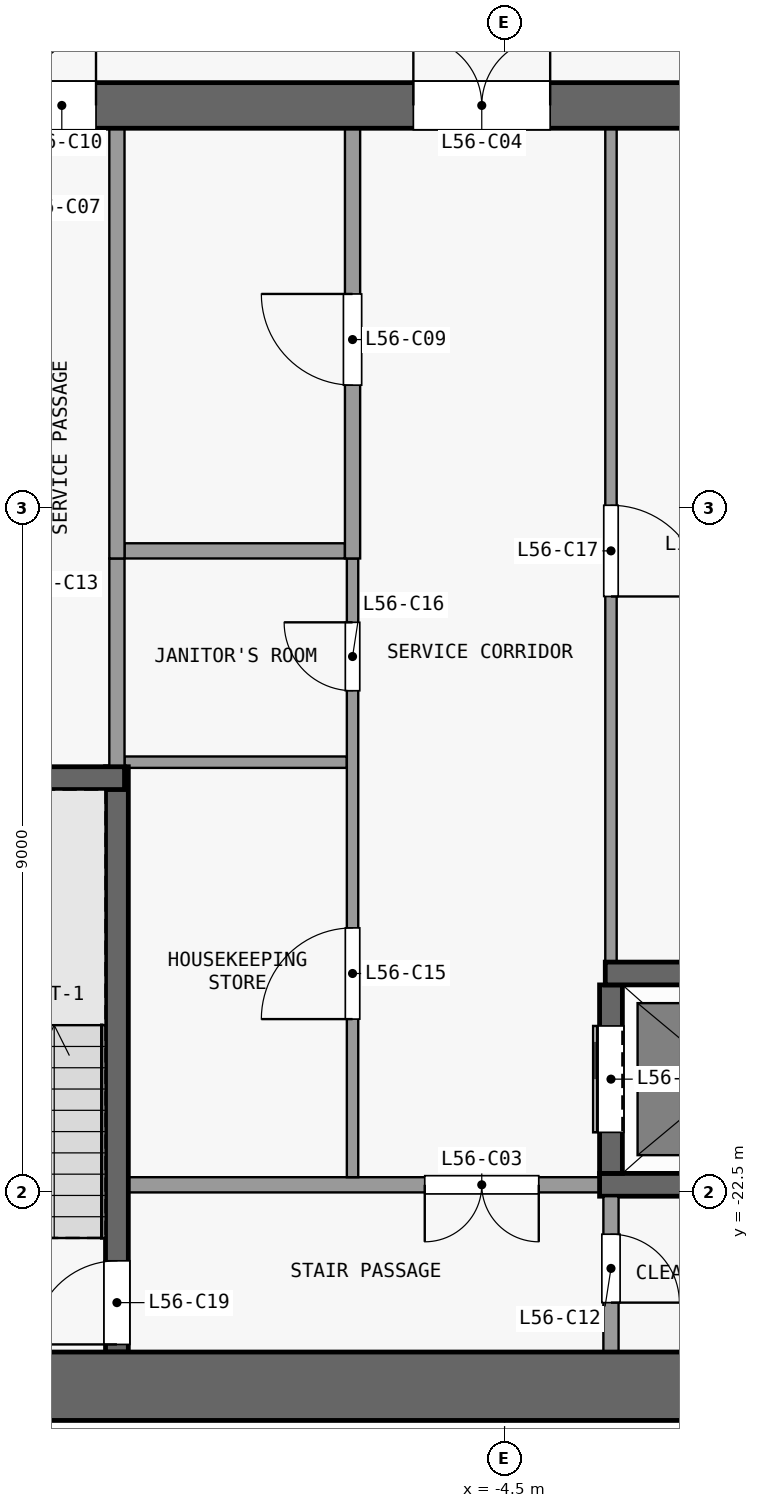
"""IFC4 building model, lengths in metres.
Left out: names, types, materials, properties, quantities, classifications, styles, units other than length and angle.
Written with IfcOpenShell. Run it as: python <this file> out.ifc"""

import sys

from ifc_helpers import new_model, si_unit, direction, frame, frame_2d, origin, place, context, subcontext, project, spatial, rectangle, extrude, element, fill, save


model = new_model("IFC4")
c1 = context("Model", 3, precision=1e-05, world=origin(), true_north=direction((0.0, 1.0)))
c2 = subcontext(c1, "Body", "Model", "MODEL_VIEW")
j1 = project(units=[si_unit("LENGTHUNIT", "METRE"), si_unit("PLANEANGLEUNIT", "RADIAN")], contexts=[c1])
p1 = place(None, origin())
s1 = spatial("IfcSite", under=j1, at=p1, CompositionType="ELEMENT")
p2 = place(p1, origin())
s2 = spatial("IfcBuilding", under=s1, at=p2, CompositionType="ELEMENT")
p3 = place(p2, frame((0.0, 0.0, 223.1)))
s3 = spatial("IfcBuildingStorey", under=s2, at=p3, CompositionType="ELEMENT", Elevation=223.1)
p4 = place(p3, frame((-13.2, -25.05, 0.0), z_axis=(0.0, 0.0, 1.0), x_axis=(1.0, 0.0, 0.0)))
e1 = element("IfcWall", 1, at=p4, inside=s3, PredefinedType="SHEAR", context=c2, shape_type="SweptSolid", body=[
    extrude(rectangle(XDim=26.4, YDim=0.9, at=frame_2d((13.2, 0.0))), origin(), (0.0, 0.0, 1.0), 3.3),
])
p5 = place(p3, frame((-13.2, -8.2, 0.0), z_axis=(0.0, 0.0, 1.0), x_axis=(1.0, 0.0, 0.0)))
e2 = element("IfcWall", 2, at=p5, inside=s3, PredefinedType="SHEAR", context=c2, shape_type="SweptSolid", body=[
    extrude(rectangle(XDim=26.4, YDim=0.6, at=frame_2d((13.2, 0.0))), origin(), (0.0, 0.0, 1.0), 3.3),
])
p6 = place(p5, frame((7.5, 0.0, 0.0)))
e3 = element("IfcOpeningElement", 3, at=p6, cuts=e2, PredefinedType="OPENING", context=c2, shape_type="SweptSolid", body=[
    extrude(rectangle(XDim=1.8, YDim=2.1, at=frame_2d((0.9, 1.05))), frame((0.0, 0.31, 0.0), z_axis=(0.0, -1.0, 0.0), x_axis=(1.0, 0.0, 0.0)), (0.0, 0.0, 1.0), 0.62),
])
p7 = place(p5, frame((17.1, 0.0, 0.0)))
e4 = element("IfcOpeningElement", 4, at=p7, cuts=e2, PredefinedType="OPENING", context=c2, shape_type="SweptSolid", body=[
    extrude(rectangle(XDim=1.8, YDim=2.1, at=frame_2d((0.9, 1.05))), frame((0.0, 0.31, 0.0), z_axis=(0.0, -1.0, 0.0), x_axis=(1.0, 0.0, 0.0)), (0.0, 0.0, 1.0), 0.62),
])
p8 = place(p5, frame((2.425, 0.0, 0.0)))
e5 = element("IfcOpeningElement", 5, at=p8, cuts=e2, PredefinedType="OPENING", context=c2, shape_type="SweptSolid", body=[
    extrude(rectangle(XDim=0.9, YDim=2.1, at=frame_2d((0.45, 1.05))), frame((0.0, 0.31, 0.0), z_axis=(0.0, -1.0, 0.0), x_axis=(1.0, 0.0, 0.0)), (0.0, 0.0, 1.0), 0.62),
])
p9 = place(p5, frame((23.075, 0.0, 0.0)))
e6 = element("IfcOpeningElement", 6, at=p9, cuts=e2, PredefinedType="OPENING", context=c2, shape_type="SweptSolid", body=[
    extrude(rectangle(XDim=0.9, YDim=2.1, at=frame_2d((0.45, 1.05))), frame((0.0, 0.31, 0.0), z_axis=(0.0, -1.0, 0.0), x_axis=(1.0, 0.0, 0.0)), (0.0, 0.0, 1.0), 0.62),
])
p10 = place(p3, frame((-3.25, -22.4, 0.0), z_axis=(0.0, 0.0, 1.0), x_axis=(-1.0, 0.0, 0.0)))
e7 = element("IfcWall", 7, at=p10, inside=s3, PredefinedType="PARTITIONING", context=c2, shape_type="SweptSolid", body=[
    extrude(rectangle(XDim=6.2, YDim=0.2, at=frame_2d((3.1, 0.0))), origin(), (0.0, 0.0, 1.0), 3.3),
])
p11 = place(p10, frame((0.8, 0.0, 0.0)))
e8 = element("IfcOpeningElement", 8, at=p11, cuts=e7, PredefinedType="OPENING", context=c2, shape_type="SweptSolid", body=[
    extrude(rectangle(XDim=1.5, YDim=2.1, at=frame_2d((0.75, 1.05))), frame((0.0, 0.11, 0.0), z_axis=(0.0, -1.0, 0.0), x_axis=(1.0, 0.0, 0.0)), (0.0, 0.0, 1.0), 0.22),
])
p12 = place(p3, frame((-3.25, -22.4, 0.0), z_axis=(0.0, 0.0, 1.0), x_axis=(1.0, 0.0, 0.0)))
e9 = element("IfcWall", 9, at=p12, inside=s3, PredefinedType="SHEAR", context=c2, shape_type="SweptSolid", body=[
    extrude(rectangle(XDim=6.5, YDim=0.3, at=frame_2d((3.25, 0.0))), origin(), (0.0, 0.0, 1.0), 3.3),
])
p13 = place(p3, frame((-3.175, -19.62, 0.0), z_axis=(0.0, 0.0, 1.0), x_axis=(1.0, 0.0, 0.0)))
e10 = element("IfcWall", 10, at=p13, inside=s3, PredefinedType="SHEAR", context=c2, shape_type="SweptSolid", body=[
    extrude(rectangle(XDim=3.025, YDim=0.3, at=frame_2d((1.513, 0.0))), origin(), (0.0, 0.0, 1.0), 3.3),
])
p14 = place(p3, frame((-12.6, -17.05, 0.0), z_axis=(0.0, 0.0, 1.0), x_axis=(1.0, 0.0, 0.0)))
e11 = element("IfcWall", 11, at=p14, inside=s3, PredefinedType="SHEAR", context=c2, shape_type="SweptSolid", body=[
    extrude(rectangle(XDim=3.1, YDim=0.3, at=frame_2d((1.55, 0.0))), origin(), (0.0, 0.0, 1.0), 3.3),
])
p15 = place(p3, frame((-9.5, -16.84, 0.0), z_axis=(0.0, 0.0, 1.0), x_axis=(1.0, 0.0, 0.0)))
e12 = element("IfcWall", 12, at=p15, inside=s3, PredefinedType="PARTITIONING", context=c2, shape_type="SweptSolid", body=[
    extrude(rectangle(XDim=2.925, YDim=0.15, at=frame_2d((1.462, 0.0))), origin(), (0.0, 0.0, 1.0), 3.3),
])
p16 = place(p3, frame((-9.5, -14.06, 0.0), z_axis=(0.0, 0.0, 1.0), x_axis=(1.0, 0.0, 0.0)))
e13 = element("IfcWall", 13, at=p16, inside=s3, PredefinedType="PARTITIONING", context=c2, shape_type="SweptSolid", body=[
    extrude(rectangle(XDim=2.9, YDim=0.2, at=frame_2d((1.45, 0.0))), origin(), (0.0, 0.0, 1.0), 3.3),
])
p17 = place(p3, frame((-9.6, -24.6, 0.0), z_axis=(0.0, 0.0, 1.0), x_axis=(0.0, 1.0, 0.0)))
e14 = element("IfcWall", 14, at=p17, inside=s3, PredefinedType="SHEAR", context=c2, shape_type="SweptSolid", body=[
    extrude(rectangle(XDim=7.7, YDim=0.3, at=frame_2d((3.85, 0.0))), origin(), (0.0, 0.0, 1.0), 3.3),
])
p18 = place(p17, frame((0.1, 0.0, 0.0)))
e15 = element("IfcOpeningElement", 15, at=p18, cuts=e14, PredefinedType="OPENING", context=c2, shape_type="SweptSolid", body=[
    extrude(rectangle(XDim=1.1, YDim=2.1, at=frame_2d((0.55, 1.05))), frame((0.0, 0.16, 0.0), z_axis=(0.0, -1.0, 0.0), x_axis=(1.0, 0.0, 0.0)), (0.0, 0.0, 1.0), 0.32),
])
p19 = place(p3, frame((-9.6, -16.9, 0.0), z_axis=(0.0, 0.0, 1.0), x_axis=(0.0, 1.0, 0.0)))
e16 = element("IfcWall", 16, at=p19, inside=s3, PredefinedType="PARTITIONING", context=c2, shape_type="SweptSolid", body=[
    extrude(rectangle(XDim=2.74, YDim=0.2, at=frame_2d((1.37, 0.0))), origin(), (0.0, 0.0, 1.0), 3.3),
])
p20 = place(p3, frame((-9.6, -14.16, 0.0), z_axis=(0.0, 0.0, 1.0), x_axis=(0.0, 1.0, 0.0)))
e17 = element("IfcWall", 17, at=p20, inside=s3, PredefinedType="PARTITIONING", context=c2, shape_type="SweptSolid", body=[
    extrude(rectangle(XDim=5.66, YDim=0.2, at=frame_2d((2.83, 0.0))), origin(), (0.0, 0.0, 1.0), 3.3),
])
p21 = place(p3, frame((-6.5, -22.3, 0.0), z_axis=(0.0, 0.0, 1.0), x_axis=(0.0, 1.0, 0.0)))
e18 = element("IfcWall", 18, at=p21, inside=s3, PredefinedType="PARTITIONING", context=c2, shape_type="SweptSolid", body=[
    extrude(rectangle(XDim=8.14, YDim=0.15, at=frame_2d((4.07, 0.0))), origin(), (0.0, 0.0, 1.0), 3.3),
])
p22 = place(p21, frame((2.08, 0.0, 0.0)))
e19 = element("IfcOpeningElement", 19, at=p22, cuts=e18, PredefinedType="OPENING", context=c2, shape_type="SweptSolid", body=[
    extrude(rectangle(XDim=1.2, YDim=2.1, at=frame_2d((0.6, 1.05))), frame((0.0, 0.085, 0.0), z_axis=(0.0, -1.0, 0.0), x_axis=(1.0, 0.0, 0.0)), (0.0, 0.0, 1.0), 0.17),
])
p23 = place(p21, frame((6.4, 0.0, 0.0)))
e20 = element("IfcOpeningElement", 20, at=p23, cuts=e18, PredefinedType="OPENING", context=c2, shape_type="SweptSolid", body=[
    extrude(rectangle(XDim=0.9, YDim=2.1, at=frame_2d((0.45, 1.05))), frame((0.0, 0.085, 0.0), z_axis=(0.0, -1.0, 0.0), x_axis=(1.0, 0.0, 0.0)), (0.0, 0.0, 1.0), 0.17),
])
p24 = place(p3, frame((-6.5, -14.16, 0.0), z_axis=(0.0, 0.0, 1.0), x_axis=(0.0, 1.0, 0.0)))
e21 = element("IfcWall", 21, at=p24, inside=s3, PredefinedType="PARTITIONING", context=c2, shape_type="SweptSolid", body=[
    extrude(rectangle(XDim=5.66, YDim=0.2, at=frame_2d((2.83, 0.0))), origin(), (0.0, 0.0, 1.0), 3.3),
])
p25 = place(p24, frame((2.28, 0.0, 0.0)))
e22 = element("IfcOpeningElement", 22, at=p25, cuts=e21, PredefinedType="OPENING", context=c2, shape_type="SweptSolid", body=[
    extrude(rectangle(XDim=1.2, YDim=2.1, at=frame_2d((0.6, 1.05))), frame((0.0, 0.11, 0.0), z_axis=(0.0, -1.0, 0.0), x_axis=(1.0, 0.0, 0.0)), (0.0, 0.0, 1.0), 0.22),
])
p26 = place(p3, frame((-3.1, -22.55, 0.0), z_axis=(0.0, 0.0, 1.0), x_axis=(0.0, -1.0, 0.0)))
e23 = element("IfcWall", 23, at=p26, inside=s3, PredefinedType="PARTITIONING", context=c2, shape_type="SweptSolid", body=[
    extrude(rectangle(XDim=2.05, YDim=0.2, at=frame_2d((1.025, 0.0))), origin(), (0.0, 0.0, 1.0), 3.3),
])
p27 = place(p26, frame((0.5, 0.0, 0.0)))
e24 = element("IfcOpeningElement", 24, at=p27, cuts=e23, PredefinedType="OPENING", context=c2, shape_type="SweptSolid", body=[
    extrude(rectangle(XDim=0.9, YDim=2.1, at=frame_2d((0.45, 1.05))), frame((0.0, 0.11, 0.0), z_axis=(0.0, -1.0, 0.0), x_axis=(1.0, 0.0, 0.0)), (0.0, 0.0, 1.0), 0.22),
])
p28 = place(p3, frame((-3.1, -22.25, 0.0), z_axis=(0.0, 0.0, 1.0), x_axis=(0.0, 1.0, 0.0)))
e25 = element("IfcWall", 25, at=p28, inside=s3, PredefinedType="SHEAR", context=c2, shape_type="SweptSolid", body=[
    extrude(rectangle(XDim=2.48, YDim=0.3, at=frame_2d((1.24, 0.0))), origin(), (0.0, 0.0, 1.0), 3.3),
])
p29 = place(p28, frame((0.54, 0.0, 0.0)))
e26 = element("IfcOpeningElement", 26, at=p29, cuts=e25, PredefinedType="OPENING", context=c2, shape_type="SweptSolid", body=[
    extrude(rectangle(XDim=1.4, YDim=2.1, at=frame_2d((0.7, 1.05))), frame((0.0, 0.16, 0.0), z_axis=(0.0, -1.0, 0.0), x_axis=(1.0, 0.0, 0.0)), (0.0, 0.0, 1.0), 0.32),
])
p30 = place(p3, frame((-3.1, -8.5, 0.0), z_axis=(0.0, 0.0, 1.0), x_axis=(0.0, -1.0, 0.0)))
e27 = element("IfcWall", 27, at=p30, inside=s3, PredefinedType="PARTITIONING", context=c2, shape_type="SweptSolid", body=[
    extrude(rectangle(XDim=10.97, YDim=0.15, at=frame_2d((5.485, 0.0))), origin(), (0.0, 0.0, 1.0), 3.3),
])
p31 = place(p30, frame((4.96, 0.0, 0.0)))
e28 = element("IfcOpeningElement", 28, at=p31, cuts=e27, PredefinedType="OPENING", context=c2, shape_type="SweptSolid", body=[
    extrude(rectangle(XDim=1.2, YDim=2.1, at=frame_2d((0.6, 1.05))), frame((0.0, 0.085, 0.0), z_axis=(0.0, -1.0, 0.0), x_axis=(1.0, 0.0, 0.0)), (0.0, 0.0, 1.0), 0.17),
])
p32 = place(p29, origin())
e29 = element("IfcDoor", 29, at=p32, inside=s3, OperationType="DOUBLE_DOOR_SLIDING", PredefinedType="DOOR", context=c2, shape_type="SweptSolid", body=[
    extrude(rectangle(XDim=1.4, YDim=2.1, at=frame_2d((0.7, 1.05))), frame((0.0, 0.025, 0.0), z_axis=(0.0, -1.0, 0.0), x_axis=(1.0, 0.0, 0.0)), (0.0, 0.0, 1.0), 0.05),
])
fill(e26, e29)
p33 = place(p11, origin())
e30 = element("IfcDoor", 30, at=p33, inside=s3, OperationType="DOUBLE_DOOR_SINGLE_SWING", PredefinedType="DOOR", context=c2, shape_type="SweptSolid", body=[
    extrude(rectangle(XDim=1.5, YDim=2.1, at=frame_2d((0.75, 1.05))), frame((0.0, 0.025, 0.0), z_axis=(0.0, -1.0, 0.0), x_axis=(1.0, 0.0, 0.0)), (0.0, 0.0, 1.0), 0.05),
])
fill(e8, e30)
p34 = place(p6, origin())
e31 = element("IfcDoor", 31, at=p34, inside=s3, OperationType="DOUBLE_DOOR_SINGLE_SWING", PredefinedType="DOOR", context=c2, shape_type="SweptSolid", body=[
    extrude(rectangle(XDim=1.8, YDim=2.1, at=frame_2d((0.9, 1.05))), frame((0.0, 0.025, 0.0), z_axis=(0.0, -1.0, 0.0), x_axis=(1.0, 0.0, 0.0)), (0.0, 0.0, 1.0), 0.05),
])
fill(e3, e31)
p35 = place(p25, origin())
e32 = element("IfcDoor", 32, at=p35, inside=s3, OperationType="SINGLE_SWING_RIGHT", PredefinedType="DOOR", context=c2, shape_type="SweptSolid", body=[
    extrude(rectangle(XDim=1.2, YDim=2.1, at=frame_2d((0.6, 1.05))), frame((0.0, 0.025, 0.0), z_axis=(0.0, -1.0, 0.0), x_axis=(1.0, 0.0, 0.0)), (0.0, 0.0, 1.0), 0.05),
])
fill(e22, e32)
p36 = place(p8, origin())
e33 = element("IfcDoor", 33, at=p36, inside=s3, OperationType="SINGLE_SWING_RIGHT", PredefinedType="DOOR", context=c2, shape_type="SweptSolid", body=[
    extrude(rectangle(XDim=0.9, YDim=2.1, at=frame_2d((0.45, 1.05))), frame((0.0, 0.025, 0.0), z_axis=(0.0, -1.0, 0.0), x_axis=(1.0, 0.0, 0.0)), (0.0, 0.0, 1.0), 0.05),
])
fill(e5, e33)
p37 = place(p27, origin())
e34 = element("IfcDoor", 34, at=p37, inside=s3, OperationType="SINGLE_SWING_RIGHT", PredefinedType="DOOR", context=c2, shape_type="SweptSolid", body=[
    extrude(rectangle(XDim=0.9, YDim=2.1, at=frame_2d((0.45, 1.05))), frame((0.0, 0.025, 0.0), z_axis=(0.0, -1.0, 0.0), x_axis=(1.0, 0.0, 0.0)), (0.0, 0.0, 1.0), 0.05),
])
fill(e24, e34)
p38 = place(p22, origin())
e35 = element("IfcDoor", 35, at=p38, inside=s3, OperationType="SINGLE_SWING_LEFT", PredefinedType="DOOR", context=c2, shape_type="SweptSolid", body=[
    extrude(rectangle(XDim=1.2, YDim=2.1, at=frame_2d((0.6, 1.05))), frame((0.0, 0.025, 0.0), z_axis=(0.0, -1.0, 0.0), x_axis=(1.0, 0.0, 0.0)), (0.0, 0.0, 1.0), 0.05),
])
fill(e19, e35)
p39 = place(p23, origin())
e36 = element("IfcDoor", 36, at=p39, inside=s3, OperationType="SINGLE_SWING_RIGHT", PredefinedType="DOOR", context=c2, shape_type="SweptSolid", body=[
    extrude(rectangle(XDim=0.9, YDim=2.1, at=frame_2d((0.45, 1.05))), frame((0.0, 0.025, 0.0), z_axis=(0.0, -1.0, 0.0), x_axis=(1.0, 0.0, 0.0)), (0.0, 0.0, 1.0), 0.05),
])
fill(e20, e36)
p40 = place(p31, origin())
e37 = element("IfcDoor", 37, at=p40, inside=s3, OperationType="SINGLE_SWING_RIGHT", PredefinedType="DOOR", context=c2, shape_type="SweptSolid", body=[
    extrude(rectangle(XDim=1.2, YDim=2.1, at=frame_2d((0.6, 1.05))), frame((0.0, 0.025, 0.0), z_axis=(0.0, -1.0, 0.0), x_axis=(1.0, 0.0, 0.0)), (0.0, 0.0, 1.0), 0.05),
])
fill(e28, e37)
p41 = place(p18, origin())
e38 = element("IfcDoor", 38, at=p41, inside=s3, OperationType="SINGLE_SWING_LEFT", PredefinedType="DOOR", context=c2, shape_type="SweptSolid", body=[
    extrude(rectangle(XDim=1.1, YDim=2.1, at=frame_2d((0.55, 1.05))), frame((0.0, 0.025, 0.0), z_axis=(0.0, -1.0, 0.0), x_axis=(1.0, 0.0, 0.0)), (0.0, 0.0, 1.0), 0.05),
])
fill(e15, e38)
save(model, sys.argv[1])
